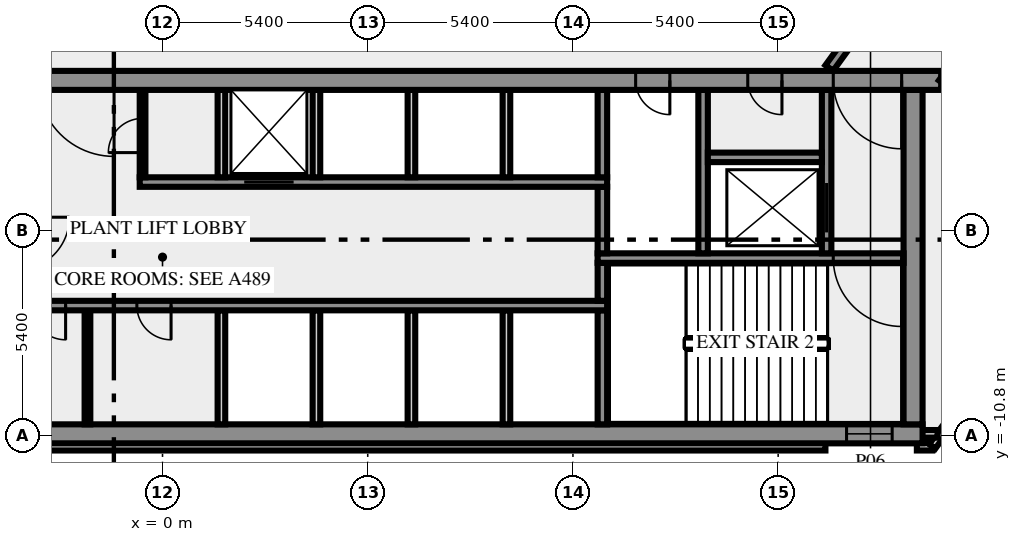
"""IFC4 building model, lengths in metres.
Left out: names, types, materials, properties, quantities, classifications, styles, units other than length and angle.
Written with IfcOpenShell. Run it as: python <this file> out.ifc"""

import sys

from ifc_helpers import new_model, si_unit, direction, frame, frame_2d, origin, place, context, subcontext, project, spatial, rectangle, extrude, element, fill, save


model = new_model("IFC4")
c1 = context("Model", 3, precision=1e-05, world=origin(), true_north=direction((0.0, 1.0)))
c2 = subcontext(c1, "Body", "Model", "MODEL_VIEW")
j1 = project(units=[si_unit("LENGTHUNIT", "METRE"), si_unit("PLANEANGLEUNIT", "RADIAN")], contexts=[c1])
p1 = place(None, origin())
s1 = spatial("IfcSite", under=j1, at=p1, CompositionType="ELEMENT")
p2 = place(p1, origin())
s2 = spatial("IfcBuilding", under=s1, at=p2, CompositionType="ELEMENT")
p3 = place(p2, frame((0.0, 0.0, 188.0)))
s3 = spatial("IfcBuildingStorey", under=s2, at=p3, CompositionType="ELEMENT", Elevation=188.0)
p4 = place(p3, frame((-17.444, -11.088, 0.0), z_axis=(0.0, 0.0, 1.0), x_axis=(1.0, 0.0, 0.0)))
e1 = element("IfcWall", 1, at=p4, inside=s3, PredefinedType="SOLIDWALL", context=c2, shape_type="SweptSolid", body=[
    extrude(rectangle(XDim=34.888, YDim=0.2, at=frame_2d((17.444, 0.0))), origin(), (0.0, 0.0, 1.0), 5.65),
])
p5 = place(p3, frame((19.85, -11.088, 0.0), z_axis=(0.0, 0.0, 1.0), x_axis=(1.0, 0.0, 0.0)))
e2 = element("IfcWall", 2, at=p5, inside=s3, PredefinedType="SOLIDWALL", context=c2, shape_type="SweptSolid", body=[
    extrude(rectangle(XDim=0.406, YDim=0.2, at=frame_2d((0.203, 0.0))), origin(), (0.0, 0.0, 1.0), 5.65),
])
p6 = place(p3, frame((20.253, -11.083, 0.0), z_axis=(0.0, 0.0, 1.0), x_axis=(0.587766567315, 0.809030569476, 0.0)))
e3 = element("IfcWall", 3, at=p6, inside=s3, PredefinedType="SOLIDWALL", context=c2, shape_type="SweptSolid", body=[
    extrude(rectangle(XDim=2.688, YDim=0.2, at=frame_2d((1.344, 0.0))), origin(), (0.0, 0.0, 1.0), 5.65),
])
p7 = place(p3, frame((19.98, -10.75, 0.0), z_axis=(0.0, 0.0, 1.0), x_axis=(1.0, 0.0, 0.0)))
e4 = element("IfcWall", 4, at=p7, inside=s3, PredefinedType="SOLIDWALL", context=c2, shape_type="SweptSolid", body=[
    extrude(rectangle(XDim=0.417, YDim=0.2, at=frame_2d((0.208, 0.0))), origin(), (0.0, 0.0, 1.0), 5.65),
])
p8 = place(p3, frame((-20.0, -10.75, 0.0), z_axis=(0.0, 0.0, 1.0), x_axis=(1.0, 0.0, 0.0)))
e5 = element("IfcWall", 5, at=p8, inside=s3, PredefinedType="SHEAR", context=c2, shape_type="SweptSolid", body=[
    extrude(rectangle(XDim=40.0, YDim=0.5, at=frame_2d((20.0, 0.0))), origin(), (0.0, 0.0, 1.0), 5.65),
])
p9 = place(p8, frame((0.8, 0.0, 1.0)))
e6 = element("IfcOpeningElement", 6, at=p9, cuts=e5, PredefinedType="OPENING", context=c2, shape_type="SweptSolid", body=[
    extrude(rectangle(XDim=1.2, YDim=1.2, at=frame_2d((0.6, 0.6))), frame((0.0, 0.26, 0.0), z_axis=(0.0, -1.0, 0.0), x_axis=(1.0, 0.0, 0.0)), (0.0, 0.0, 1.0), 0.52),
])
p10 = place(p8, frame((38.0, 0.0, 1.0)))
e7 = element("IfcOpeningElement", 7, at=p10, cuts=e5, PredefinedType="OPENING", context=c2, shape_type="SweptSolid", body=[
    extrude(rectangle(XDim=1.2, YDim=1.2, at=frame_2d((0.6, 0.6))), frame((0.0, 0.26, 0.0), z_axis=(0.0, -1.0, 0.0), x_axis=(1.0, 0.0, 0.0)), (0.0, 0.0, 1.0), 0.52),
])
p11 = place(p3, frame((-1.975, -10.5, 0.0), z_axis=(0.0, 0.0, 1.0), x_axis=(0.0, 1.0, 0.0)))
e8 = element("IfcWall", 8, at=p11, inside=s3, PredefinedType="PARTITIONING", context=c2, shape_type="SweptSolid", body=[
    extrude(rectangle(XDim=3.0, YDim=0.15, at=frame_2d((1.5, 0.0))), origin(), (0.0, 0.0, 1.0), 5.65),
])
for number, where, z_axis, x_axis in (
    (9, (1.55, -10.5, 0.0), (0.0, 0.0, 1.0), (0.0, 1.0, 0.0)),
    (10, (4.05, -10.5, 0.0), (0.0, 0.0, 1.0), (0.0, 1.0, 0.0)),
    (11, (6.55, -10.5, 0.0), (0.0, 0.0, 1.0), (0.0, 1.0, 0.0)),
    (12, (9.05, -10.5, 0.0), (0.0, 0.0, 1.0), (0.0, 1.0, 0.0)),
):
    element("IfcWall", number, at=place(p3, frame(where, z_axis=z_axis, x_axis=x_axis)), inside=s3, PredefinedType="SOLIDWALL", context=c2, shape_type="SweptSolid", body=[
        extrude(rectangle(XDim=3.0, YDim=0.2, at=frame_2d((1.5, 0.0))), origin(), (0.0, 0.0, 1.0), 5.65),
    ])
p12 = place(p3, frame((11.575, -10.5, 0.0), z_axis=(0.0, 0.0, 1.0), x_axis=(0.0, 1.0, 0.0)))
e13 = element("IfcWall", 13, at=p12, inside=s3, PredefinedType="SHEAR", context=c2, shape_type="SweptSolid", body=[
    extrude(rectangle(XDim=3.0, YDim=0.25, at=frame_2d((1.5, 0.0))), origin(), (0.0, 0.0, 1.0), 5.65),
])
p13 = place(p3, frame((19.75, -10.5, 0.0), z_axis=(0.0, 0.0, 1.0), x_axis=(0.0, 1.0, 0.0)))
e14 = element("IfcWall", 14, at=p13, inside=s3, PredefinedType="SHEAR", context=c2, shape_type="SweptSolid", body=[
    extrude(rectangle(XDim=8.8, YDim=0.5, at=frame_2d((4.4, 0.0))), origin(), (0.0, 0.0, 1.0), 5.65),
])
p14 = place(p3, frame((11.7, -7.375, 0.0), z_axis=(0.0, 0.0, 1.0), x_axis=(-1.0, 0.0, 0.0)))
e15 = element("IfcWall", 15, at=p14, inside=s3, PredefinedType="SHEAR", context=c2, shape_type="SweptSolid", body=[
    extrude(rectangle(XDim=23.4, YDim=0.25, at=frame_2d((11.7, 0.0))), origin(), (0.0, 0.0, 1.0), 5.65),
])
p15 = place(p14, frame((21.012, 0.0, 0.0)))
e16 = element("IfcOpeningElement", 16, at=p15, cuts=e15, PredefinedType="OPENING", context=c2, shape_type="SweptSolid", body=[
    extrude(rectangle(XDim=0.9, YDim=2.1, at=frame_2d((0.45, 1.05))), frame((0.0, 0.135, 0.0), z_axis=(0.0, -1.0, 0.0), x_axis=(1.0, 0.0, 0.0)), (0.0, 0.0, 1.0), 0.27),
])
p16 = place(p14, frame((17.287, 0.0, 0.0)))
e17 = element("IfcOpeningElement", 17, at=p16, cuts=e15, PredefinedType="OPENING", context=c2, shape_type="SweptSolid", body=[
    extrude(rectangle(XDim=0.9, YDim=2.1, at=frame_2d((0.45, 1.05))), frame((0.0, 0.135, 0.0), z_axis=(0.0, -1.0, 0.0), x_axis=(1.0, 0.0, 0.0)), (0.0, 0.0, 1.0), 0.27),
])
p17 = place(p14, frame((14.25, 0.0, 0.0)))
e18 = element("IfcOpeningElement", 18, at=p17, cuts=e15, PredefinedType="OPENING", context=c2, shape_type="SweptSolid", body=[
    extrude(rectangle(XDim=0.9, YDim=2.1, at=frame_2d((0.45, 1.05))), frame((0.0, 0.135, 0.0), z_axis=(0.0, -1.0, 0.0), x_axis=(1.0, 0.0, 0.0)), (0.0, 0.0, 1.0), 0.27),
])
p18 = place(p14, frame((11.475, 0.0, 0.0)))
e19 = element("IfcOpeningElement", 19, at=p18, cuts=e15, PredefinedType="OPENING", context=c2, shape_type="SweptSolid", body=[
    extrude(rectangle(XDim=0.9, YDim=2.1, at=frame_2d((0.45, 1.05))), frame((0.0, 0.135, 0.0), z_axis=(0.0, -1.0, 0.0), x_axis=(1.0, 0.0, 0.0)), (0.0, 0.0, 1.0), 0.27),
])
p19 = place(p3, frame((11.575, -7.25, 0.0), z_axis=(0.0, 0.0, 1.0), x_axis=(0.0, 1.0, 0.0)))
e20 = element("IfcWall", 20, at=p19, inside=s3, PredefinedType="SHEAR", context=c2, shape_type="SweptSolid", body=[
    extrude(rectangle(XDim=1.0, YDim=0.25, at=frame_2d((0.5, 0.0))), origin(), (0.0, 0.0, 1.0), 5.65),
])
p20 = place(p3, frame((19.5, -6.125, 0.0), z_axis=(0.0, 0.0, 1.0), x_axis=(-1.0, 0.0, 0.0)))
e21 = element("IfcWall", 21, at=p20, inside=s3, PredefinedType="SHEAR", context=c2, shape_type="SweptSolid", body=[
    extrude(rectangle(XDim=8.05, YDim=0.25, at=frame_2d((4.025, 0.0))), origin(), (0.0, 0.0, 1.0), 5.65),
])
p21 = place(p20, frame((0.05, 0.0, 0.0)))
e22 = element("IfcOpeningElement", 22, at=p21, cuts=e21, PredefinedType="OPENING", context=c2, shape_type="SweptSolid", body=[
    extrude(rectangle(XDim=1.8, YDim=2.1, at=frame_2d((0.9, 1.05))), frame((0.0, 0.135, 0.0), z_axis=(0.0, -1.0, 0.0), x_axis=(1.0, 0.0, 0.0)), (0.0, 0.0, 1.0), 0.27),
])
p22 = place(p3, frame((11.575, -6.0, 0.0), z_axis=(0.0, 0.0, 1.0), x_axis=(0.0, 1.0, 0.0)))
e23 = element("IfcWall", 23, at=p22, inside=s3, PredefinedType="SHEAR", context=c2, shape_type="SweptSolid", body=[
    extrude(rectangle(XDim=1.75, YDim=0.25, at=frame_2d((0.875, 0.0))), origin(), (0.0, 0.0, 1.0), 5.65),
])
p23 = place(p3, frame((14.225, -6.0, 0.0), z_axis=(0.0, 0.0, 1.0), x_axis=(0.0, 1.0, 0.0)))
e24 = element("IfcWall", 24, at=p23, inside=s3, PredefinedType="SHEAR", context=c2, shape_type="SweptSolid", body=[
    extrude(rectangle(XDim=4.3, YDim=0.25, at=frame_2d((2.15, 0.0))), origin(), (0.0, 0.0, 1.0), 5.65),
])
p24 = place(p3, frame((17.475, -6.0, 0.0), z_axis=(0.0, 0.0, 1.0), x_axis=(0.0, 1.0, 0.0)))
e25 = element("IfcWall", 25, at=p24, inside=s3, PredefinedType="SHEAR", context=c2, shape_type="SweptSolid", body=[
    extrude(rectangle(XDim=4.3, YDim=0.25, at=frame_2d((2.15, 0.0))), origin(), (0.0, 0.0, 1.0), 5.65),
])
p25 = place(p24, frame((0.55, 0.0, 0.0)))
e26 = element("IfcOpeningElement", 26, at=p25, cuts=e25, PredefinedType="OPENING", context=c2, shape_type="SweptSolid", body=[
    extrude(rectangle(XDim=1.3, YDim=2.1, at=frame_2d((0.65, 1.05))), frame((0.0, 0.135, 0.0), z_axis=(0.0, -1.0, 0.0), x_axis=(1.0, 0.0, 0.0)), (0.0, 0.0, 1.0), 0.27),
])
p26 = place(p3, frame((-0.6, -4.125, 0.0), z_axis=(0.0, 0.0, 1.0), x_axis=(1.0, 0.0, 0.0)))
e27 = element("IfcWall", 27, at=p26, inside=s3, PredefinedType="SHEAR", context=c2, shape_type="SweptSolid", body=[
    extrude(rectangle(XDim=12.3, YDim=0.25, at=frame_2d((6.15, 0.0))), origin(), (0.0, 0.0, 1.0), 5.65),
])
p27 = place(p26, frame((2.75, 0.0, 0.0)))
e28 = element("IfcOpeningElement", 28, at=p27, cuts=e27, PredefinedType="OPENING", context=c2, shape_type="SweptSolid", body=[
    extrude(rectangle(XDim=1.3, YDim=2.1, at=frame_2d((0.65, 1.05))), frame((0.0, 0.135, 0.0), z_axis=(0.0, -1.0, 0.0), x_axis=(1.0, 0.0, 0.0)), (0.0, 0.0, 1.0), 0.27),
])
p28 = place(p3, frame((-0.525, -4.0, 0.0), z_axis=(0.0, 0.0, 1.0), x_axis=(0.0, 1.0, 0.0)))
e29 = element("IfcWall", 29, at=p28, inside=s3, PredefinedType="PARTITIONING", context=c2, shape_type="SweptSolid", body=[
    extrude(rectangle(XDim=2.3, YDim=0.15, at=frame_2d((1.15, 0.0))), origin(), (0.0, 0.0, 1.0), 5.65),
])
p29 = place(p28, frame((0.65, 0.0, 0.0)))
e30 = element("IfcOpeningElement", 30, at=p29, cuts=e29, PredefinedType="OPENING", context=c2, shape_type="SweptSolid", body=[
    extrude(rectangle(XDim=0.9, YDim=2.1, at=frame_2d((0.45, 1.05))), frame((0.0, 0.085, 0.0), z_axis=(0.0, -1.0, 0.0), x_axis=(1.0, 0.0, 0.0)), (0.0, 0.0, 1.0), 0.17),
])
for number, where, z_axis, x_axis in (
    (31, (1.55, -4.0, 0.0), (0.0, 0.0, 1.0), (0.0, 1.0, 0.0)),
    (32, (4.05, -4.0, 0.0), (0.0, 0.0, 1.0), (0.0, 1.0, 0.0)),
    (33, (6.55, -4.0, 0.0), (0.0, 0.0, 1.0), (0.0, 1.0, 0.0)),
    (34, (9.05, -4.0, 0.0), (0.0, 0.0, 1.0), (0.0, 1.0, 0.0)),
):
    element("IfcWall", number, at=place(p3, frame(where, z_axis=z_axis, x_axis=x_axis)), inside=s3, PredefinedType="SOLIDWALL", context=c2, shape_type="SweptSolid", body=[
        extrude(rectangle(XDim=2.3, YDim=0.2, at=frame_2d((1.15, 0.0))), origin(), (0.0, 0.0, 1.0), 5.65),
    ])
p30 = place(p3, frame((11.575, -4.0, 0.0), z_axis=(0.0, 0.0, 1.0), x_axis=(0.0, 1.0, 0.0)))
e35 = element("IfcWall", 35, at=p30, inside=s3, PredefinedType="SHEAR", context=c2, shape_type="SweptSolid", body=[
    extrude(rectangle(XDim=2.3, YDim=0.25, at=frame_2d((1.15, 0.0))), origin(), (0.0, 0.0, 1.0), 5.65),
])
p31 = place(p3, frame((14.35, -3.475, 0.0), z_axis=(0.0, 0.0, 1.0), x_axis=(1.0, 0.0, 0.0)))
e36 = element("IfcWall", 36, at=p31, inside=s3, PredefinedType="SHEAR", context=c2, shape_type="SweptSolid", body=[
    extrude(rectangle(XDim=3.0, YDim=0.25, at=frame_2d((1.5, 0.0))), origin(), (0.0, 0.0, 1.0), 5.65),
])
p32 = place(p3, frame((20.49, -1.45, 0.0), z_axis=(0.0, 0.0, 1.0), x_axis=(-1.0, 0.0, 0.0)))
e37 = element("IfcWall", 37, at=p32, inside=s3, PredefinedType="SHEAR", context=c2, shape_type="SweptSolid", body=[
    extrude(rectangle(XDim=40.98, YDim=0.5, at=frame_2d((20.49, 0.0))), origin(), (0.0, 0.0, 1.0), 5.65),
])
p33 = place(p32, frame((38.14, 0.0, 0.0)))
e38 = element("IfcOpeningElement", 38, at=p33, cuts=e37, PredefinedType="OPENING", context=c2, shape_type="SweptSolid", body=[
    extrude(rectangle(XDim=1.8, YDim=2.1, at=frame_2d((0.9, 1.05))), frame((0.0, 0.26, 0.0), z_axis=(0.0, -1.0, 0.0), x_axis=(1.0, 0.0, 0.0)), (0.0, 0.0, 1.0), 0.52),
])
p34 = place(p32, frame((36.728, 0.0, 0.0)))
e39 = element("IfcOpeningElement", 39, at=p34, cuts=e37, PredefinedType="OPENING", context=c2, shape_type="SweptSolid", body=[
    extrude(rectangle(XDim=0.8, YDim=2.1, at=frame_2d((0.4, 1.05))), frame((0.0, 0.26, 0.0), z_axis=(0.0, -1.0, 0.0), x_axis=(1.0, 0.0, 0.0)), (0.0, 0.0, 1.0), 0.52),
])
p35 = place(p32, frame((35.153, 0.0, 0.0)))
e40 = element("IfcOpeningElement", 40, at=p35, cuts=e37, PredefinedType="OPENING", context=c2, shape_type="SweptSolid", body=[
    extrude(rectangle(XDim=0.8, YDim=2.1, at=frame_2d((0.4, 1.05))), frame((0.0, 0.26, 0.0), z_axis=(0.0, -1.0, 0.0), x_axis=(1.0, 0.0, 0.0)), (0.0, 0.0, 1.0), 0.52),
])
p36 = place(p32, frame((32.94, 0.0, 0.0)))
e41 = element("IfcOpeningElement", 41, at=p36, cuts=e37, PredefinedType="OPENING", context=c2, shape_type="SweptSolid", body=[
    extrude(rectangle(XDim=0.9, YDim=2.1, at=frame_2d((0.45, 1.05))), frame((0.0, 0.26, 0.0), z_axis=(0.0, -1.0, 0.0), x_axis=(1.0, 0.0, 0.0)), (0.0, 0.0, 1.0), 0.52),
])
p37 = place(p32, frame((30.502, 0.0, 0.0)))
e42 = element("IfcOpeningElement", 42, at=p37, cuts=e37, PredefinedType="OPENING", context=c2, shape_type="SweptSolid", body=[
    extrude(rectangle(XDim=0.9, YDim=2.1, at=frame_2d((0.45, 1.05))), frame((0.0, 0.26, 0.0), z_axis=(0.0, -1.0, 0.0), x_axis=(1.0, 0.0, 0.0)), (0.0, 0.0, 1.0), 0.52),
])
p38 = place(p32, frame((28.14, 0.0, 0.0)))
e43 = element("IfcOpeningElement", 43, at=p38, cuts=e37, PredefinedType="OPENING", context=c2, shape_type="SweptSolid", body=[
    extrude(rectangle(XDim=0.9, YDim=2.1, at=frame_2d((0.45, 1.05))), frame((0.0, 0.26, 0.0), z_axis=(0.0, -1.0, 0.0), x_axis=(1.0, 0.0, 0.0)), (0.0, 0.0, 1.0), 0.52),
])
p39 = place(p32, frame((25.478, 0.0, 0.0)))
e44 = element("IfcOpeningElement", 44, at=p39, cuts=e37, PredefinedType="OPENING", context=c2, shape_type="SweptSolid", body=[
    extrude(rectangle(XDim=0.9, YDim=2.1, at=frame_2d((0.45, 1.05))), frame((0.0, 0.26, 0.0), z_axis=(0.0, -1.0, 0.0), x_axis=(1.0, 0.0, 0.0)), (0.0, 0.0, 1.0), 0.52),
])
p40 = place(p32, frame((21.765, 0.0, 0.0)))
e45 = element("IfcOpeningElement", 45, at=p40, cuts=e37, PredefinedType="OPENING", context=c2, shape_type="SweptSolid", body=[
    extrude(rectangle(XDim=2.0, YDim=2.1, at=frame_2d((1.0, 1.05))), frame((0.0, 0.26, 0.0), z_axis=(0.0, -1.0, 0.0), x_axis=(1.0, 0.0, 0.0)), (0.0, 0.0, 1.0), 0.52),
])
p41 = place(p32, frame((7.14, 0.0, 0.0)))
e46 = element("IfcOpeningElement", 46, at=p41, cuts=e37, PredefinedType="OPENING", context=c2, shape_type="SweptSolid", body=[
    extrude(rectangle(XDim=0.9, YDim=2.1, at=frame_2d((0.45, 1.05))), frame((0.0, 0.26, 0.0), z_axis=(0.0, -1.0, 0.0), x_axis=(1.0, 0.0, 0.0)), (0.0, 0.0, 1.0), 0.52),
])
p42 = place(p32, frame((4.19, 0.0, 0.0)))
e47 = element("IfcOpeningElement", 47, at=p42, cuts=e37, PredefinedType="OPENING", context=c2, shape_type="SweptSolid", body=[
    extrude(rectangle(XDim=0.9, YDim=2.1, at=frame_2d((0.45, 1.05))), frame((0.0, 0.26, 0.0), z_axis=(0.0, -1.0, 0.0), x_axis=(1.0, 0.0, 0.0)), (0.0, 0.0, 1.0), 0.52),
])
p43 = place(p32, frame((1.04, 0.0, 0.0)))
e48 = element("IfcOpeningElement", 48, at=p43, cuts=e37, PredefinedType="OPENING", context=c2, shape_type="SweptSolid", body=[
    extrude(rectangle(XDim=1.8, YDim=2.1, at=frame_2d((0.9, 1.05))), frame((0.0, 0.26, 0.0), z_axis=(0.0, -1.0, 0.0), x_axis=(1.0, 0.0, 0.0)), (0.0, 0.0, 1.0), 0.52),
])
p44 = place(p3, frame((17.545, -1.125, 0.0), z_axis=(0.0, 0.0, 1.0), x_axis=(0.587789755823, 0.80901372235, 0.0)))
e49 = element("IfcWall", 49, at=p44, inside=s3, PredefinedType="SOLIDWALL", context=c2, shape_type="SweptSolid", body=[
    extrude(rectangle(XDim=23.645, YDim=0.25, at=frame_2d((11.822, 0.0))), origin(), (0.0, 0.0, 1.0), 5.65),
])
p45 = place(p44, frame((3.442, 0.0, 0.0)))
e50 = element("IfcOpeningElement", 50, at=p45, cuts=e49, PredefinedType="OPENING", context=c2, shape_type="SweptSolid", body=[
    extrude(rectangle(XDim=1.2, YDim=2.1, at=frame_2d((0.6, 1.05))), frame((0.0, 0.135, 0.0), z_axis=(0.0, -1.0, 0.0), x_axis=(1.0, 0.0, 0.0)), (0.0, 0.0, 1.0), 0.27),
])
p46 = place(p3, frame((33.531, 16.369, 0.0), z_axis=(0.0, 0.0, 1.0), x_axis=(-0.587781095509, -0.809020014438, 0.0)))
e51 = element("IfcWall", 51, at=p46, inside=s3, PredefinedType="SOLIDWALL", context=c2, shape_type="SweptSolid", body=[
    extrude(rectangle(XDim=22.117, YDim=0.25, at=frame_2d((11.058, 0.0))), origin(), (0.0, 0.0, 1.0), 5.65),
])
p47 = place(p46, frame((20.384, 0.0, 0.0)))
e52 = element("IfcOpeningElement", 52, at=p47, cuts=e51, PredefinedType="OPENING", context=c2, shape_type="SweptSolid", body=[
    extrude(rectangle(XDim=1.2, YDim=2.1, at=frame_2d((0.6, 1.05))), frame((0.0, 0.135, 0.0), z_axis=(0.0, -1.0, 0.0), x_axis=(1.0, 0.0, 0.0)), (0.0, 0.0, 1.0), 0.27),
])
p48 = place(p10, origin())
e53 = element("IfcWindow", 53, at=p48, inside=s3, PartitioningType="SINGLE_PANEL", PredefinedType="WINDOW", context=c2, shape_type="SweptSolid", body=[
    extrude(rectangle(XDim=1.2, YDim=1.2, at=frame_2d((0.6, 0.6))), frame((0.0, 0.03, 0.0), z_axis=(0.0, -1.0, 0.0), x_axis=(1.0, 0.0, 0.0)), (0.0, 0.0, 1.0), 0.06),
])
fill(e7, e53)
p49 = place(p17, origin())
e54 = element("IfcDoor", 54, at=p49, inside=s3, OperationType="SINGLE_SWING_RIGHT", PredefinedType="DOOR", context=c2, shape_type="SweptSolid", body=[
    extrude(rectangle(XDim=0.9, YDim=2.1, at=frame_2d((0.45, 1.05))), frame((0.0, 0.025, 0.0), z_axis=(0.0, -1.0, 0.0), x_axis=(1.0, 0.0, 0.0)), (0.0, 0.0, 1.0), 0.05),
])
fill(e18, e54)
p50 = place(p18, origin())
e55 = element("IfcDoor", 55, at=p50, inside=s3, OperationType="SINGLE_SWING_RIGHT", PredefinedType="DOOR", context=c2, shape_type="SweptSolid", body=[
    extrude(rectangle(XDim=0.9, YDim=2.1, at=frame_2d((0.45, 1.05))), frame((0.0, 0.025, 0.0), z_axis=(0.0, -1.0, 0.0), x_axis=(1.0, 0.0, 0.0)), (0.0, 0.0, 1.0), 0.05),
])
fill(e19, e55)
p51 = place(p21, origin())
e56 = element("IfcDoor", 56, at=p51, inside=s3, OperationType="DOUBLE_DOOR_SINGLE_SWING", PredefinedType="DOOR", context=c2, shape_type="SweptSolid", body=[
    extrude(rectangle(XDim=1.8, YDim=2.1, at=frame_2d((0.9, 1.05))), frame((0.0, 0.025, 0.0), z_axis=(0.0, -1.0, 0.0), x_axis=(1.0, 0.0, 0.0)), (0.0, 0.0, 1.0), 0.05),
])
fill(e22, e56)
p52 = place(p25, origin())
e57 = element("IfcDoor", 57, at=p52, inside=s3, OperationType="DOUBLE_DOOR_SLIDING", PredefinedType="DOOR", context=c2, shape_type="SweptSolid", body=[
    extrude(rectangle(XDim=1.3, YDim=2.1, at=frame_2d((0.65, 1.05))), frame((0.0, 0.025, 0.0), z_axis=(0.0, -1.0, 0.0), x_axis=(1.0, 0.0, 0.0)), (0.0, 0.0, 1.0), 0.05),
])
fill(e26, e57)
p53 = place(p27, origin())
e58 = element("IfcDoor", 58, at=p53, inside=s3, OperationType="DOUBLE_DOOR_SLIDING", PredefinedType="DOOR", context=c2, shape_type="SweptSolid", body=[
    extrude(rectangle(XDim=1.3, YDim=2.1, at=frame_2d((0.65, 1.05))), frame((0.0, 0.025, 0.0), z_axis=(0.0, -1.0, 0.0), x_axis=(1.0, 0.0, 0.0)), (0.0, 0.0, 1.0), 0.05),
])
fill(e28, e58)
p54 = place(p29, origin())
e59 = element("IfcDoor", 59, at=p54, inside=s3, OperationType="SINGLE_SWING_LEFT", PredefinedType="DOOR", context=c2, shape_type="SweptSolid", body=[
    extrude(rectangle(XDim=0.9, YDim=2.1, at=frame_2d((0.45, 1.05))), frame((0.0, 0.025, 0.0), z_axis=(0.0, -1.0, 0.0), x_axis=(1.0, 0.0, 0.0)), (0.0, 0.0, 1.0), 0.05),
])
fill(e30, e59)
p55 = place(p40, origin())
e60 = element("IfcDoor", 60, at=p55, inside=s3, OperationType="DOUBLE_DOOR_SINGLE_SWING", PredefinedType="DOOR", context=c2, shape_type="SweptSolid", body=[
    extrude(rectangle(XDim=2.0, YDim=2.1, at=frame_2d((1.0, 1.05))), frame((0.0, 0.025, 0.0), z_axis=(0.0, -1.0, 0.0), x_axis=(1.0, 0.0, 0.0)), (0.0, 0.0, 1.0), 0.05),
])
fill(e45, e60)
p56 = place(p41, origin())
e61 = element("IfcDoor", 61, at=p56, inside=s3, OperationType="SINGLE_SWING_LEFT", PredefinedType="DOOR", context=c2, shape_type="SweptSolid", body=[
    extrude(rectangle(XDim=0.9, YDim=2.1, at=frame_2d((0.45, 1.05))), frame((0.0, 0.025, 0.0), z_axis=(0.0, -1.0, 0.0), x_axis=(1.0, 0.0, 0.0)), (0.0, 0.0, 1.0), 0.05),
])
fill(e46, e61)
p57 = place(p42, origin())
e62 = element("IfcDoor", 62, at=p57, inside=s3, OperationType="SINGLE_SWING_LEFT", PredefinedType="DOOR", context=c2, shape_type="SweptSolid", body=[
    extrude(rectangle(XDim=0.9, YDim=2.1, at=frame_2d((0.45, 1.05))), frame((0.0, 0.025, 0.0), z_axis=(0.0, -1.0, 0.0), x_axis=(1.0, 0.0, 0.0)), (0.0, 0.0, 1.0), 0.05),
])
fill(e47, e62)
p58 = place(p43, origin())
e63 = element("IfcDoor", 63, at=p58, inside=s3, OperationType="DOUBLE_DOOR_SINGLE_SWING", PredefinedType="DOOR", context=c2, shape_type="SweptSolid", body=[
    extrude(rectangle(XDim=1.8, YDim=2.1, at=frame_2d((0.9, 1.05))), frame((0.0, 0.025, 0.0), z_axis=(0.0, -1.0, 0.0), x_axis=(1.0, 0.0, 0.0)), (0.0, 0.0, 1.0), 0.05),
])
fill(e48, e63)
save(model, sys.argv[1])
